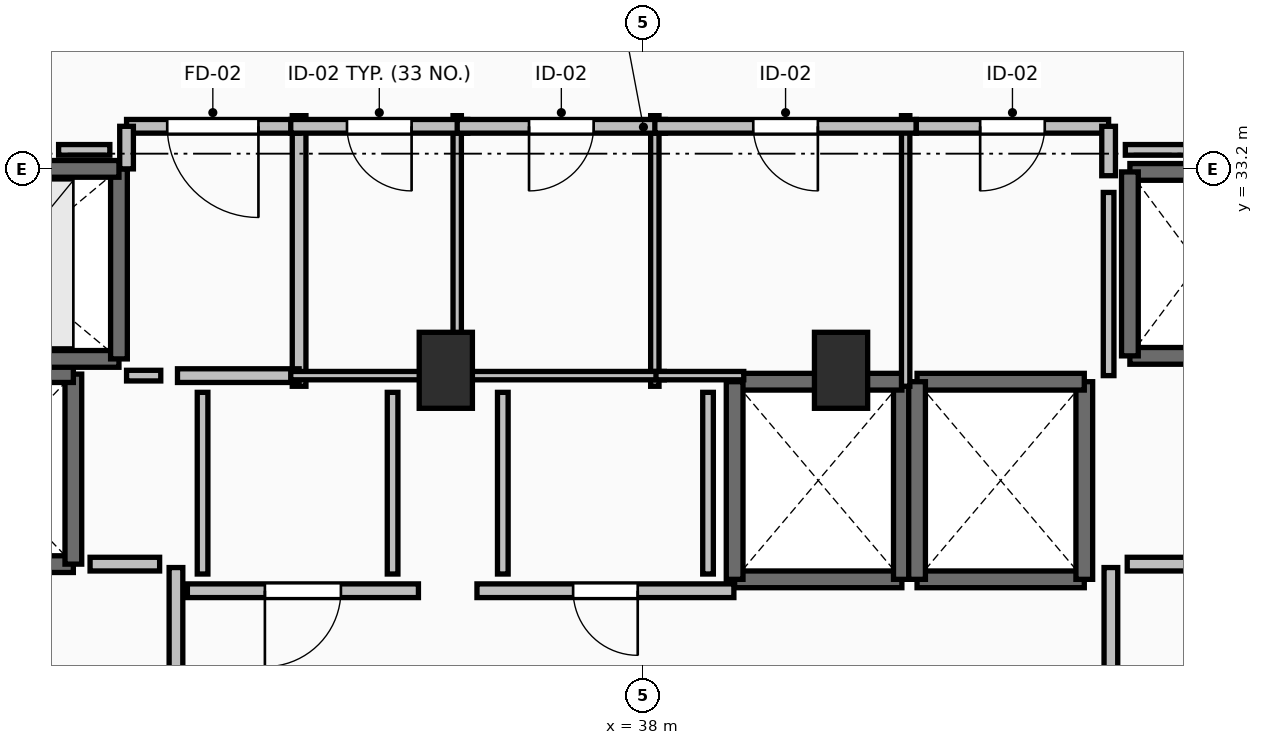
"""IFC4 building model, lengths in metres.
Left out: names, types, materials, properties, quantities, classifications, styles, units other than length and angle.
Written with IfcOpenShell. Run it as: python <this file> out.ifc"""

import sys

from ifc_helpers import new_model, si_unit, direction, frame, frame_2d, origin, origin_2d, place, context, subcontext, project, spatial, rectangle, extrude, element, fill, save


model = new_model("IFC4")
c1 = context("Model", 3, precision=1e-05, world=origin(), true_north=direction((0.0, 1.0)))
c2 = subcontext(c1, "Body", "Model", "MODEL_VIEW")
j1 = project(units=[si_unit("LENGTHUNIT", "METRE"), si_unit("PLANEANGLEUNIT", "RADIAN")], contexts=[c1])
p1 = place(None, origin())
s1 = spatial("IfcSite", under=j1, at=p1, CompositionType="ELEMENT")
p2 = place(p1, origin())
s2 = spatial("IfcBuilding", under=s1, at=p2, CompositionType="ELEMENT")
p3 = place(p2, frame((0.0, 0.0, 214.3)))
s3 = spatial("IfcBuildingStorey", under=s2, at=p3, CompositionType="ELEMENT", Elevation=214.3)
for number, where, z_axis, x_axis in (
    (1, (35.4, 30.55, 0.0), (0.0, 0.0, 1.0), (1.0, 0.0, 0.0)),
    (2, (40.6, 30.55, 0.0), (0.0, 0.0, 1.0), (1.0, 0.0, 0.0)),
):
    element("IfcColumn", number, at=place(p3, frame(where, z_axis=z_axis, x_axis=x_axis)), inside=s3, PredefinedType="PILASTER", context=c2, shape_type="SweptSolid", body=[
        extrude(rectangle(XDim=0.7, YDim=1.0, at=origin_2d()), origin(), (0.0, 0.0, 1.0), 3.55),
    ])
p4 = place(p3, frame((39.2, 27.8, 0.0), z_axis=(0.0, 0.0, 1.0), x_axis=(1.0, 0.0, 0.0)))
e3 = element("IfcWall", 3, at=p4, inside=s3, PredefinedType="SOLIDWALL", context=c2, shape_type="SweptSolid", body=[
    extrude(rectangle(XDim=2.2, YDim=0.22, at=frame_2d((1.1, 0.0))), origin(), (0.0, 0.0, 1.0), 3.29),
])
p5 = place(p3, frame((41.4, 27.8, 0.0), z_axis=(0.0, 0.0, 1.0), x_axis=(0.0, 1.0, 0.0)))
e4 = element("IfcWall", 4, at=p5, inside=s3, PredefinedType="SOLIDWALL", context=c2, shape_type="SweptSolid", body=[
    extrude(rectangle(XDim=2.6, YDim=0.22, at=frame_2d((1.3, 0.0))), origin(), (0.0, 0.0, 1.0), 3.29),
])
p6 = place(p3, frame((41.4, 30.4, 0.0), z_axis=(0.0, 0.0, 1.0), x_axis=(-1.0, 0.0, 0.0)))
e5 = element("IfcWall", 5, at=p6, inside=s3, PredefinedType="SOLIDWALL", context=c2, shape_type="SweptSolid", body=[
    extrude(rectangle(XDim=2.2, YDim=0.22, at=frame_2d((1.1, 0.0))), origin(), (0.0, 0.0, 1.0), 3.29),
])
p7 = place(p3, frame((39.2, 30.4, 0.0), z_axis=(0.0, 0.0, 1.0), x_axis=(0.0, -1.0, 0.0)))
e6 = element("IfcWall", 6, at=p7, inside=s3, PredefinedType="SOLIDWALL", context=c2, shape_type="SweptSolid", body=[
    extrude(rectangle(XDim=2.6, YDim=0.22, at=frame_2d((1.3, 0.0))), origin(), (0.0, 0.0, 1.0), 3.29),
])
p8 = place(p3, frame((41.6, 27.8, 0.0), z_axis=(0.0, 0.0, 1.0), x_axis=(1.0, 0.0, 0.0)))
e7 = element("IfcWall", 7, at=p8, inside=s3, PredefinedType="SOLIDWALL", context=c2, shape_type="SweptSolid", body=[
    extrude(rectangle(XDim=2.2, YDim=0.22, at=frame_2d((1.1, 0.0))), origin(), (0.0, 0.0, 1.0), 3.29),
])
p9 = place(p3, frame((43.8, 27.8, 0.0), z_axis=(0.0, 0.0, 1.0), x_axis=(0.0, 1.0, 0.0)))
e8 = element("IfcWall", 8, at=p9, inside=s3, PredefinedType="SOLIDWALL", context=c2, shape_type="SweptSolid", body=[
    extrude(rectangle(XDim=2.6, YDim=0.22, at=frame_2d((1.3, 0.0))), origin(), (0.0, 0.0, 1.0), 3.29),
])
p10 = place(p3, frame((43.8, 30.4, 0.0), z_axis=(0.0, 0.0, 1.0), x_axis=(-1.0, 0.0, 0.0)))
e9 = element("IfcWall", 9, at=p10, inside=s3, PredefinedType="SOLIDWALL", context=c2, shape_type="SweptSolid", body=[
    extrude(rectangle(XDim=2.2, YDim=0.22, at=frame_2d((1.1, 0.0))), origin(), (0.0, 0.0, 1.0), 3.29),
])
p11 = place(p3, frame((41.6, 30.4, 0.0), z_axis=(0.0, 0.0, 1.0), x_axis=(0.0, -1.0, 0.0)))
e10 = element("IfcWall", 10, at=p11, inside=s3, PredefinedType="SOLIDWALL", context=c2, shape_type="SweptSolid", body=[
    extrude(rectangle(XDim=2.6, YDim=0.22, at=frame_2d((1.3, 0.0))), origin(), (0.0, 0.0, 1.0), 3.29),
])
for number, where, z_axis, x_axis in (
    (11, (44.4, 30.74, 0.0), (0.0, 0.0, 1.0), (1.0, 0.0, 0.0)),
    (12, (46.2, 33.16, 0.0), (0.0, 0.0, 1.0), (-1.0, 0.0, 0.0)),
):
    element("IfcWall", number, at=place(p3, frame(where, z_axis=z_axis, x_axis=x_axis)), inside=s3, PredefinedType="SOLIDWALL", context=c2, shape_type="SweptSolid", body=[
        extrude(rectangle(XDim=1.8, YDim=0.22, at=frame_2d((0.9, 0.0))), origin(), (0.0, 0.0, 1.0), 3.29),
    ])
p12 = place(p3, frame((44.4, 33.16, 0.0), z_axis=(0.0, 0.0, 1.0), x_axis=(0.0, -1.0, 0.0)))
e13 = element("IfcWall", 13, at=p12, inside=s3, PredefinedType="SOLIDWALL", context=c2, shape_type="SweptSolid", body=[
    extrude(rectangle(XDim=2.42, YDim=0.22, at=frame_2d((1.21, 0.0))), origin(), (0.0, 0.0, 1.0), 3.29),
])
p13 = place(p3, frame((28.1, 28.0, 0.0), z_axis=(0.0, 0.0, 1.0), x_axis=(1.0, 0.0, 0.0)))
e14 = element("IfcWall", 14, at=p13, inside=s3, PredefinedType="SHEAR", context=c2, shape_type="SweptSolid", body=[
    extrude(rectangle(XDim=2.4, YDim=0.22, at=frame_2d((1.2, 0.0))), origin(), (0.0, 0.0, 1.0), 3.29),
])
p14 = place(p13, frame((0.6, 0.0, 0.0)))
e15 = element("IfcOpeningElement", 15, at=p14, cuts=e14, PredefinedType="OPENING", context=c2, shape_type="SweptSolid", body=[
    extrude(rectangle(XDim=1.2, YDim=2.2, at=frame_2d((0.6, 1.1))), frame((0.0, 0.125, 0.0), z_axis=(0.0, -1.0, 0.0), x_axis=(1.0, 0.0, 0.0)), (0.0, 0.0, 1.0), 0.25),
])
p15 = place(p3, frame((30.5, 28.0, 0.0), z_axis=(0.0, 0.0, 1.0), x_axis=(0.0, 1.0, 0.0)))
e16 = element("IfcWall", 16, at=p15, inside=s3, PredefinedType="SHEAR", context=c2, shape_type="SweptSolid", body=[
    extrude(rectangle(XDim=2.5, YDim=0.22, at=frame_2d((1.25, 0.0))), origin(), (0.0, 0.0, 1.0), 3.29),
])
p16 = place(p3, frame((30.5, 30.5, 0.0), z_axis=(0.0, 0.0, 1.0), x_axis=(-1.0, 0.0, 0.0)))
e17 = element("IfcWall", 17, at=p16, inside=s3, PredefinedType="SHEAR", context=c2, shape_type="SweptSolid", body=[
    extrude(rectangle(XDim=2.4, YDim=0.22, at=frame_2d((1.2, 0.0))), origin(), (0.0, 0.0, 1.0), 3.29),
])
p17 = place(p3, frame((28.1, 30.7, 0.0), z_axis=(0.0, 0.0, 1.0), x_axis=(1.0, 0.0, 0.0)))
e18 = element("IfcWall", 18, at=p17, inside=s3, PredefinedType="SOLIDWALL", context=c2, shape_type="SweptSolid", body=[
    extrude(rectangle(XDim=3.0, YDim=0.22, at=frame_2d((1.5, 0.0))), origin(), (0.0, 0.0, 1.0), 3.29),
])
p18 = place(p3, frame((31.1, 30.7, 0.0), z_axis=(0.0, 0.0, 1.0), x_axis=(0.0, 1.0, 0.0)))
e19 = element("IfcWall", 19, at=p18, inside=s3, PredefinedType="SOLIDWALL", context=c2, shape_type="SweptSolid", body=[
    extrude(rectangle(XDim=2.5, YDim=0.22, at=frame_2d((1.25, 0.0))), origin(), (0.0, 0.0, 1.0), 3.29),
])
p19 = place(p3, frame((31.1, 33.2, 0.0), z_axis=(0.0, 0.0, 1.0), x_axis=(-1.0, 0.0, 0.0)))
e20 = element("IfcWall", 20, at=p19, inside=s3, PredefinedType="SOLIDWALL", context=c2, shape_type="SweptSolid", body=[
    extrude(rectangle(XDim=3.0, YDim=0.22, at=frame_2d((1.5, 0.0))), origin(), (0.0, 0.0, 1.0), 3.29),
])
p20 = place(p19, frame((0.9, 0.0, 0.0)))
e21 = element("IfcOpeningElement", 21, at=p20, cuts=e20, PredefinedType="OPENING", context=c2, shape_type="SweptSolid", body=[
    extrude(rectangle(XDim=1.2, YDim=2.2, at=frame_2d((0.6, 1.1))), frame((0.0, 0.125, 0.0), z_axis=(0.0, -1.0, 0.0), x_axis=(1.0, 0.0, 0.0)), (0.0, 0.0, 1.0), 0.25),
])
p21 = place(p3, frame((31.85, 24.045, 0.0), z_axis=(0.0, 0.0, 1.0), x_axis=(0.0, 1.0, 0.0)))
e22 = element("IfcWall", 22, at=p21, inside=s3, PredefinedType="PARTITIONING", context=c2, shape_type="SweptSolid", body=[
    extrude(rectangle(XDim=3.91, YDim=0.18, at=frame_2d((1.955, 0.0))), origin(), (0.0, 0.0, 1.0), 3.29),
])
p22 = place(p21, frame((1.355, 0.0, 0.0)))
e23 = element("IfcOpeningElement", 23, at=p22, cuts=e22, PredefinedType="OPENING", context=c2, shape_type="SweptSolid", body=[
    extrude(rectangle(XDim=1.2, YDim=2.15, at=frame_2d((0.6, 1.075))), frame((0.0, 0.105, 0.0), z_axis=(0.0, -1.0, 0.0), x_axis=(1.0, 0.0, 0.0)), (0.0, 0.0, 1.0), 0.21),
])
p23 = place(p3, frame((44.15, 27.955, 0.0), z_axis=(0.0, 0.0, 1.0), x_axis=(0.0, -1.0, 0.0)))
e24 = element("IfcWall", 24, at=p23, inside=s3, PredefinedType="PARTITIONING", context=c2, shape_type="SweptSolid", body=[
    extrude(rectangle(XDim=3.91, YDim=0.18, at=frame_2d((1.955, 0.0))), origin(), (0.0, 0.0, 1.0), 3.29),
])
p24 = place(p23, frame((1.355, 0.0, 0.0)))
e25 = element("IfcOpeningElement", 25, at=p24, cuts=e24, PredefinedType="OPENING", context=c2, shape_type="SweptSolid", body=[
    extrude(rectangle(XDim=1.2, YDim=2.15, at=frame_2d((0.6, 1.075))), frame((0.0, 0.105, 0.0), z_axis=(0.0, -1.0, 0.0), x_axis=(1.0, 0.0, 0.0)), (0.0, 0.0, 1.0), 0.21),
])
p25 = place(p3, frame((33.47, 30.34, 0.0), z_axis=(0.0, 0.0, 1.0), x_axis=(0.0, 1.0, 0.0)))
e26 = element("IfcWall", 26, at=p25, inside=s3, PredefinedType="PARTITIONING", context=c2, shape_type="SweptSolid", body=[
    extrude(rectangle(XDim=3.56, YDim=0.18, at=frame_2d((1.78, 0.0))), origin(), (0.0, 0.0, 1.0), 3.29),
])
p26 = place(p3, frame((31.87, 30.48, 0.0), z_axis=(0.0, 0.0, 1.0), x_axis=(1.0, 0.0, 0.0)))
e27 = element("IfcWall", 27, at=p26, inside=s3, PredefinedType="PARTITIONING", context=c2, shape_type="SweptSolid", body=[
    extrude(rectangle(XDim=1.6, YDim=0.18, at=frame_2d((0.8, 0.0))), origin(), (0.0, 0.0, 1.0), 3.29),
])
p27 = place(p3, frame((33.47, 33.76, 0.0), z_axis=(0.0, 0.0, 1.0), x_axis=(-1.0, 0.0, 0.0)))
e28 = element("IfcWall", 28, at=p27, inside=s3, PredefinedType="PARTITIONING", context=c2, shape_type="SweptSolid", body=[
    extrude(rectangle(XDim=2.27, YDim=0.18, at=frame_2d((1.135, 0.0))), origin(), (0.0, 0.0, 1.0), 3.29),
])
p28 = place(p27, frame((0.535, 0.0, 0.0)))
e29 = element("IfcOpeningElement", 29, at=p28, cuts=e28, PredefinedType="OPENING", context=c2, shape_type="SweptSolid", body=[
    extrude(rectangle(XDim=1.2, YDim=2.15, at=frame_2d((0.6, 1.075))), frame((0.0, 0.105, 0.0), z_axis=(0.0, -1.0, 0.0), x_axis=(1.0, 0.0, 0.0)), (0.0, 0.0, 1.0), 0.21),
])
p29 = place(p3, frame((31.2, 33.76, 0.0), z_axis=(0.0, 0.0, 1.0), x_axis=(0.0, -1.0, 0.0)))
e30 = element("IfcWall", 30, at=p29, inside=s3, PredefinedType="PARTITIONING", context=c2, shape_type="SweptSolid", body=[
    extrude(rectangle(XDim=0.56, YDim=0.18, at=frame_2d((0.28, 0.0))), origin(), (0.0, 0.0, 1.0), 3.29),
])
p30 = place(p3, frame((35.04, 27.65, 0.0), z_axis=(0.0, 0.0, 1.0), x_axis=(-1.0, 0.0, 0.0)))
e31 = element("IfcWall", 31, at=p30, inside=s3, PredefinedType="PARTITIONING", context=c2, shape_type="SweptSolid", body=[
    extrude(rectangle(XDim=3.04, YDim=0.18, at=frame_2d((1.52, 0.0))), origin(), (0.0, 0.0, 1.0), 3.29),
])
p31 = place(p30, frame((1.02, 0.0, 0.0)))
e32 = element("IfcOpeningElement", 32, at=p31, cuts=e31, PredefinedType="OPENING", context=c2, shape_type="SweptSolid", body=[
    extrude(rectangle(XDim=1.0, YDim=2.15, at=frame_2d((0.5, 1.075))), frame((0.0, 0.105, 0.0), z_axis=(0.0, -1.0, 0.0), x_axis=(1.0, 0.0, 0.0)), (0.0, 0.0, 1.0), 0.21),
])
p32 = place(p3, frame((39.19, 27.65, 0.0), z_axis=(0.0, 0.0, 1.0), x_axis=(-1.0, 0.0, 0.0)))
e33 = element("IfcWall", 33, at=p32, inside=s3, PredefinedType="PARTITIONING", context=c2, shape_type="SweptSolid", body=[
    extrude(rectangle(XDim=3.38, YDim=0.18, at=frame_2d((1.69, 0.0))), origin(), (0.0, 0.0, 1.0), 3.29),
])
p33 = place(p32, frame((1.265, 0.0, 0.0)))
e34 = element("IfcOpeningElement", 34, at=p33, cuts=e33, PredefinedType="OPENING", context=c2, shape_type="SweptSolid", body=[
    extrude(rectangle(XDim=0.85, YDim=2.1, at=frame_2d((0.425, 1.05))), frame((0.0, 0.105, 0.0), z_axis=(0.0, -1.0, 0.0), x_axis=(1.0, 0.0, 0.0)), (0.0, 0.0, 1.0), 0.21),
])
p34 = place(p3, frame((35.55, 30.34, 0.0), z_axis=(0.0, 0.0, 1.0), x_axis=(0.0, 1.0, 0.0)))
e35 = element("IfcWall", 35, at=p34, inside=s3, PredefinedType="PARTITIONING", context=c2, shape_type="SweptSolid", body=[
    extrude(rectangle(XDim=3.56, YDim=0.11, at=frame_2d((1.78, 0.0))), origin(), (0.0, 0.0, 1.0), 2.482),
])
p35 = place(p3, frame((33.36, 30.48, 0.0), z_axis=(0.0, 0.0, 1.0), x_axis=(1.0, 0.0, 0.0)))
e36 = element("IfcWall", 36, at=p35, inside=s3, PredefinedType="PARTITIONING", context=c2, shape_type="SweptSolid", body=[
    extrude(rectangle(XDim=1.81, YDim=0.11, at=frame_2d((0.905, 0.0))), origin(), (0.0, 0.0, 1.0), 3.29),
])
p36 = place(p3, frame((35.69, 33.76, 0.0), z_axis=(0.0, 0.0, 1.0), x_axis=(-1.0, 0.0, 0.0)))
e37 = element("IfcWall", 37, at=p36, inside=s3, PredefinedType="PARTITIONING", context=c2, shape_type="SweptSolid", body=[
    extrude(rectangle(XDim=2.33, YDim=0.18, at=frame_2d((1.165, 0.0))), origin(), (0.0, 0.0, 1.0), 3.29),
])
p37 = place(p36, frame((0.74, 0.0, 0.0)))
e38 = element("IfcOpeningElement", 38, at=p37, cuts=e37, PredefinedType="OPENING", context=c2, shape_type="SweptSolid", body=[
    extrude(rectangle(XDim=0.85, YDim=2.1, at=frame_2d((0.425, 1.05))), frame((0.0, 0.105, 0.0), z_axis=(0.0, -1.0, 0.0), x_axis=(1.0, 0.0, 0.0)), (0.0, 0.0, 1.0), 0.21),
])
p38 = place(p3, frame((38.15, 30.34, 0.0), z_axis=(0.0, 0.0, 1.0), x_axis=(0.0, 1.0, 0.0)))
e39 = element("IfcWall", 39, at=p38, inside=s3, PredefinedType="PARTITIONING", context=c2, shape_type="SweptSolid", body=[
    extrude(rectangle(XDim=3.56, YDim=0.11, at=frame_2d((1.78, 0.0))), origin(), (0.0, 0.0, 1.0), 2.482),
])
p39 = place(p3, frame((35.68, 30.48, 0.0), z_axis=(0.0, 0.0, 1.0), x_axis=(1.0, 0.0, 0.0)))
e40 = element("IfcWall", 40, at=p39, inside=s3, PredefinedType="PARTITIONING", context=c2, shape_type="SweptSolid", body=[
    extrude(rectangle(XDim=2.595, YDim=0.11, at=frame_2d((1.297, 0.0))), origin(), (0.0, 0.0, 1.0), 2.482),
])
p40 = place(p3, frame((38.29, 33.76, 0.0), z_axis=(0.0, 0.0, 1.0), x_axis=(-1.0, 0.0, 0.0)))
e41 = element("IfcWall", 41, at=p40, inside=s3, PredefinedType="PARTITIONING", context=c2, shape_type="SweptSolid", body=[
    extrude(rectangle(XDim=2.74, YDim=0.18, at=frame_2d((1.37, 0.0))), origin(), (0.0, 0.0, 1.0), 3.29),
])
p41 = place(p40, frame((0.945, 0.0, 0.0)))
e42 = element("IfcOpeningElement", 42, at=p41, cuts=e41, PredefinedType="OPENING", context=c2, shape_type="SweptSolid", body=[
    extrude(rectangle(XDim=0.85, YDim=2.1, at=frame_2d((0.425, 1.05))), frame((0.0, 0.105, 0.0), z_axis=(0.0, -1.0, 0.0), x_axis=(1.0, 0.0, 0.0)), (0.0, 0.0, 1.0), 0.21),
])
p42 = place(p3, frame((41.45, 30.34, 0.0), z_axis=(0.0, 0.0, 1.0), x_axis=(0.0, 1.0, 0.0)))
e43 = element("IfcWall", 43, at=p42, inside=s3, PredefinedType="PARTITIONING", context=c2, shape_type="SweptSolid", body=[
    extrude(rectangle(XDim=3.56, YDim=0.11, at=frame_2d((1.78, 0.0))), origin(), (0.0, 0.0, 1.0), 3.29),
])
p43 = place(p3, frame((38.165, 30.48, 0.0), z_axis=(0.0, 0.0, 1.0), x_axis=(1.0, 0.0, 0.0)))
e44 = element("IfcWall", 44, at=p43, inside=s3, PredefinedType="PARTITIONING", context=c2, shape_type="SweptSolid", body=[
    extrude(rectangle(XDim=1.155, YDim=0.11, at=frame_2d((0.578, 0.0))), origin(), (0.0, 0.0, 1.0), 2.482),
])
p44 = place(p3, frame((41.59, 33.76, 0.0), z_axis=(0.0, 0.0, 1.0), x_axis=(-1.0, 0.0, 0.0)))
e45 = element("IfcWall", 45, at=p44, inside=s3, PredefinedType="PARTITIONING", context=c2, shape_type="SweptSolid", body=[
    extrude(rectangle(XDim=3.44, YDim=0.18, at=frame_2d((1.72, 0.0))), origin(), (0.0, 0.0, 1.0), 3.29),
])
p45 = place(p44, frame((1.295, 0.0, 0.0)))
e46 = element("IfcOpeningElement", 46, at=p45, cuts=e45, PredefinedType="OPENING", context=c2, shape_type="SweptSolid", body=[
    extrude(rectangle(XDim=0.85, YDim=2.1, at=frame_2d((0.425, 1.05))), frame((0.0, 0.105, 0.0), z_axis=(0.0, -1.0, 0.0), x_axis=(1.0, 0.0, 0.0)), (0.0, 0.0, 1.0), 0.21),
])
p46 = place(p3, frame((44.12, 33.76, 0.0), z_axis=(0.0, 0.0, 1.0), x_axis=(-1.0, 0.0, 0.0)))
e47 = element("IfcWall", 47, at=p46, inside=s3, PredefinedType="PARTITIONING", context=c2, shape_type="SweptSolid", body=[
    extrude(rectangle(XDim=2.53, YDim=0.18, at=frame_2d((1.265, 0.0))), origin(), (0.0, 0.0, 1.0), 3.29),
])
p47 = place(p46, frame((0.84, 0.0, 0.0)))
e48 = element("IfcOpeningElement", 48, at=p47, cuts=e47, PredefinedType="OPENING", context=c2, shape_type="SweptSolid", body=[
    extrude(rectangle(XDim=0.85, YDim=2.1, at=frame_2d((0.425, 1.05))), frame((0.0, 0.105, 0.0), z_axis=(0.0, -1.0, 0.0), x_axis=(1.0, 0.0, 0.0)), (0.0, 0.0, 1.0), 0.21),
])
p48 = place(p3, frame((44.12, 33.11, 0.0), z_axis=(0.0, 0.0, 1.0), x_axis=(0.0, 1.0, 0.0)))
e49 = element("IfcWall", 49, at=p48, inside=s3, PredefinedType="PARTITIONING", context=c2, shape_type="SweptSolid", body=[
    extrude(rectangle(XDim=0.65, YDim=0.18, at=frame_2d((0.325, 0.0))), origin(), (0.0, 0.0, 1.0), 3.29),
])
for number, where, z_axis, x_axis in (
    (50, (31.635, 28.0, 0.0), (0.0, 0.0, 1.0), (-1.0, 0.0, 0.0)),
    (51, (45.28, 28.0, 0.0), (0.0, 0.0, 1.0), (-1.0, 0.0, 0.0)),
):
    element("IfcWall", number, at=place(p3, frame(where, z_axis=z_axis, x_axis=x_axis)), inside=s3, PredefinedType="PARTITIONING", context=c2, shape_type="SweptSolid", body=[
        extrude(rectangle(XDim=0.915, YDim=0.18, at=frame_2d((0.458, 0.0))), origin(), (0.0, 0.0, 1.0), 3.29),
    ])
p49 = place(p3, frame((31.2, 30.48, 0.0), z_axis=(0.0, 0.0, 1.0), x_axis=(1.0, 0.0, 0.0)))
e52 = element("IfcWall", 52, at=p49, inside=s3, PredefinedType="PARTITIONING", context=c2, shape_type="SweptSolid", body=[
    extrude(rectangle(XDim=0.45, YDim=0.14, at=frame_2d((0.225, 0.0))), origin(), (0.0, 0.0, 1.0), 3.29),
])
p50 = place(p3, frame((44.12, 30.48, 0.0), z_axis=(0.0, 0.0, 1.0), x_axis=(0.0, 1.0, 0.0)))
e53 = element("IfcWall", 53, at=p50, inside=s3, PredefinedType="PARTITIONING", context=c2, shape_type="SweptSolid", body=[
    extrude(rectangle(XDim=2.41, YDim=0.14, at=frame_2d((1.205, 0.0))), origin(), (0.0, 0.0, 1.0), 3.29),
])
for number, where, z_axis, x_axis in (
    (54, (32.2, 30.26, 0.0), (0.0, 0.0, 1.0), (0.0, -1.0, 0.0)),
    (55, (34.7, 27.87, 0.0), (0.0, 0.0, 1.0), (0.0, 1.0, 0.0)),
    (56, (36.15, 30.26, 0.0), (0.0, 0.0, 1.0), (0.0, -1.0, 0.0)),
    (57, (38.85, 27.87, 0.0), (0.0, 0.0, 1.0), (0.0, 1.0, 0.0)),
):
    element("IfcWall", number, at=place(p3, frame(where, z_axis=z_axis, x_axis=x_axis)), inside=s3, PredefinedType="PARTITIONING", context=c2, shape_type="SweptSolid", body=[
        extrude(rectangle(XDim=2.39, YDim=0.14, at=frame_2d((1.195, 0.0))), origin(), (0.0, 0.0, 1.0), 3.29),
    ])
p51 = place(p3, frame((48.55, 33.45, 0.0), z_axis=(0.0, 0.0, 1.0), x_axis=(-1.0, 0.0, 0.0)))
e58 = element("IfcWall", 58, at=p51, inside=s3, PredefinedType="PARTITIONING", context=c2, shape_type="SweptSolid", body=[
    extrude(rectangle(XDim=4.21, YDim=0.14, at=frame_2d((2.105, 0.0))), origin(), (0.0, 0.0, 1.0), 2.482),
])
p52 = place(p3, frame((30.98, 33.45, 0.0), z_axis=(0.0, 0.0, 1.0), x_axis=(-1.0, 0.0, 0.0)))
e59 = element("IfcWall", 59, at=p52, inside=s3, PredefinedType="PARTITIONING", context=c2, shape_type="SweptSolid", body=[
    extrude(rectangle(XDim=0.674, YDim=0.14, at=frame_2d((0.337, 0.0))), origin(), (0.0, 0.0, 1.0), 3.29),
])
p53 = place(p28, origin())
e60 = element("IfcDoor", 60, at=p53, inside=s3, OperationType="SINGLE_SWING_LEFT", PredefinedType="DOOR", context=c2, shape_type="SweptSolid", body=[
    extrude(rectangle(XDim=1.2, YDim=2.15, at=frame_2d((0.6, 1.075))), frame((0.0, 0.025, 0.0), z_axis=(0.0, -1.0, 0.0), x_axis=(1.0, 0.0, 0.0)), (0.0, 0.0, 1.0), 0.05),
])
fill(e29, e60)
p54 = place(p31, origin())
e61 = element("IfcDoor", 61, at=p54, inside=s3, OperationType="SINGLE_SWING_RIGHT", PredefinedType="DOOR", context=c2, shape_type="SweptSolid", body=[
    extrude(rectangle(XDim=1.0, YDim=2.15, at=frame_2d((0.5, 1.075))), frame((0.0, 0.025, 0.0), z_axis=(0.0, -1.0, 0.0), x_axis=(1.0, 0.0, 0.0)), (0.0, 0.0, 1.0), 0.05),
])
fill(e32, e61)
p55 = place(p33, origin())
e62 = element("IfcDoor", 62, at=p55, inside=s3, OperationType="SINGLE_SWING_LEFT", PredefinedType="DOOR", context=c2, shape_type="SweptSolid", body=[
    extrude(rectangle(XDim=0.85, YDim=2.1, at=frame_2d((0.425, 1.05))), frame((0.0, 0.025, 0.0), z_axis=(0.0, -1.0, 0.0), x_axis=(1.0, 0.0, 0.0)), (0.0, 0.0, 1.0), 0.05),
])
fill(e34, e62)
p56 = place(p37, origin())
e63 = element("IfcDoor", 63, at=p56, inside=s3, OperationType="SINGLE_SWING_LEFT", PredefinedType="DOOR", context=c2, shape_type="SweptSolid", body=[
    extrude(rectangle(XDim=0.85, YDim=2.1, at=frame_2d((0.425, 1.05))), frame((0.0, 0.025, 0.0), z_axis=(0.0, -1.0, 0.0), x_axis=(1.0, 0.0, 0.0)), (0.0, 0.0, 1.0), 0.05),
])
fill(e38, e63)
p57 = place(p41, origin())
e64 = element("IfcDoor", 64, at=p57, inside=s3, OperationType="SINGLE_SWING_RIGHT", PredefinedType="DOOR", context=c2, shape_type="SweptSolid", body=[
    extrude(rectangle(XDim=0.85, YDim=2.1, at=frame_2d((0.425, 1.05))), frame((0.0, 0.025, 0.0), z_axis=(0.0, -1.0, 0.0), x_axis=(1.0, 0.0, 0.0)), (0.0, 0.0, 1.0), 0.05),
])
fill(e42, e64)
p58 = place(p45, origin())
e65 = element("IfcDoor", 65, at=p58, inside=s3, OperationType="SINGLE_SWING_LEFT", PredefinedType="DOOR", context=c2, shape_type="SweptSolid", body=[
    extrude(rectangle(XDim=0.85, YDim=2.1, at=frame_2d((0.425, 1.05))), frame((0.0, 0.025, 0.0), z_axis=(0.0, -1.0, 0.0), x_axis=(1.0, 0.0, 0.0)), (0.0, 0.0, 1.0), 0.05),
])
fill(e46, e65)
p59 = place(p47, origin())
e66 = element("IfcDoor", 66, at=p59, inside=s3, OperationType="SINGLE_SWING_RIGHT", PredefinedType="DOOR", context=c2, shape_type="SweptSolid", body=[
    extrude(rectangle(XDim=0.85, YDim=2.1, at=frame_2d((0.425, 1.05))), frame((0.0, 0.025, 0.0), z_axis=(0.0, -1.0, 0.0), x_axis=(1.0, 0.0, 0.0)), (0.0, 0.0, 1.0), 0.05),
])
fill(e48, e66)
save(model, sys.argv[1])
